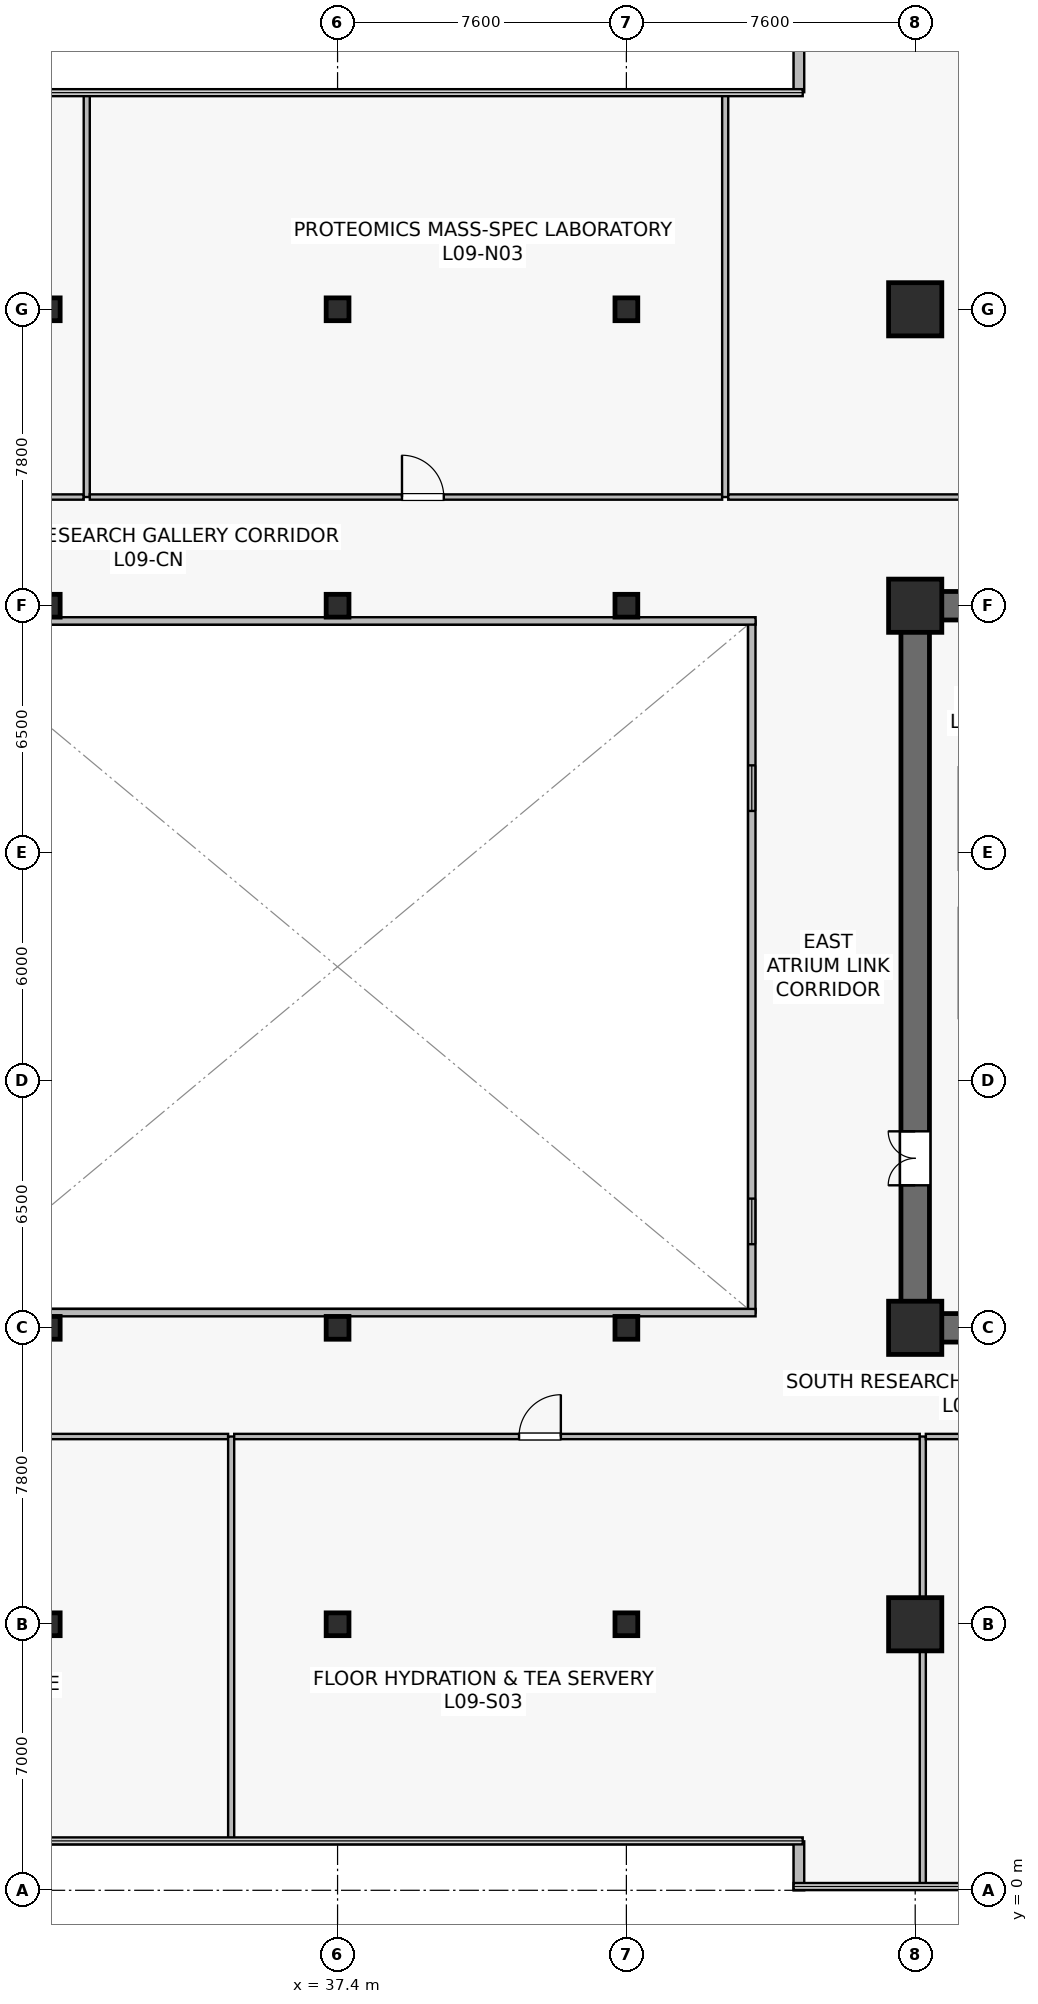
"""IFC4 building model, lengths in metres.
Left out: names, types, materials, properties, quantities, classifications, styles, units other than length and angle.
Written with IfcOpenShell. Run it as: python <this file> out.ifc"""

import sys

from ifc_helpers import new_model, si_unit, direction, frame, frame_2d, origin, origin_2d, place, context, subcontext, project, spatial, rectangle, hollow_rectangle, extrude, source, transform, mapped, element, fill, save


model = new_model("IFC4")
c1 = context("Model", 3, precision=1e-05, world=origin(), true_north=direction((0.0, 1.0)))
c2 = subcontext(c1, "Body", "Model", "MODEL_VIEW")
j1 = project(units=[si_unit("LENGTHUNIT", "METRE"), si_unit("PLANEANGLEUNIT", "RADIAN")], contexts=[c1])
p1 = place(None, origin())
s1 = spatial("IfcSite", under=j1, at=p1, CompositionType="ELEMENT")
p2 = place(p1, origin())
s2 = spatial("IfcBuilding", under=s1, at=p2, CompositionType="ELEMENT")
p3 = place(p2, frame((0.0, 0.0, 37.5)))
s3 = spatial("IfcBuildingStorey", under=s2, at=p3, CompositionType="ELEMENT", Elevation=37.5)
p4 = place(p3, frame((52.225, 14.8, 0.0), z_axis=(0.0, 0.0, 1.0), x_axis=(1.0, 0.0, 0.0)))
e1 = element("IfcWall", 1, at=p4, inside=s3, PredefinedType="SHEAR", context=c2, shape_type="SweptSolid", body=[
    extrude(rectangle(XDim=15.55, YDim=0.75, at=frame_2d((7.775, 0.0))), origin(), (0.0, 0.0, 1.0), 3.78),
])
p5 = place(p3, frame((52.225, 33.8, 0.0), z_axis=(0.0, 0.0, 1.0), x_axis=(1.0, 0.0, 0.0)))
e2 = element("IfcWall", 2, at=p5, inside=s3, PredefinedType="SHEAR", context=c2, shape_type="SweptSolid", body=[
    extrude(rectangle(XDim=15.55, YDim=0.75, at=frame_2d((7.775, 0.0))), origin(), (0.0, 0.0, 1.0), 3.78),
])
p6 = place(p5, frame((6.175, 0.0, 0.0)))
e3 = element("IfcOpeningElement", 3, at=p6, cuts=e2, PredefinedType="OPENING", context=c2, shape_type="SweptSolid", body=[
    extrude(rectangle(XDim=0.95, YDim=2.15, at=frame_2d((0.475, 1.075))), frame((0.0, 0.385, 0.0), z_axis=(0.0, -1.0, 0.0), x_axis=(1.0, 0.0, 0.0)), (0.0, 0.0, 1.0), 0.77),
])
p7 = place(p5, frame((2.635, 0.0, 0.0)))
e4 = element("IfcOpeningElement", 4, at=p7, cuts=e2, PredefinedType="OPENING", context=c2, shape_type="SweptSolid", body=[
    extrude(rectangle(XDim=0.95, YDim=2.15, at=frame_2d((0.475, 1.075))), frame((0.0, 0.385, 0.0), z_axis=(0.0, -1.0, 0.0), x_axis=(1.0, 0.0, 0.0)), (0.0, 0.0, 1.0), 0.77),
])
p8 = place(p3, frame((52.6, 15.175, 0.0), z_axis=(0.0, 0.0, 1.0), x_axis=(0.0, 1.0, 0.0)))
e5 = element("IfcWall", 5, at=p8, inside=s3, PredefinedType="SHEAR", context=c2, shape_type="SweptSolid", body=[
    extrude(rectangle(XDim=18.25, YDim=0.75, at=frame_2d((9.125, 0.0))), origin(), (0.0, 0.0, 1.0), 3.78),
])
p9 = place(p8, frame((3.375, 0.0, 0.0)))
e6 = element("IfcOpeningElement", 6, at=p9, cuts=e5, PredefinedType="OPENING", context=c2, shape_type="SweptSolid", body=[
    extrude(rectangle(XDim=1.42, YDim=2.2, at=frame_2d((0.71, 1.1))), frame((0.0, 0.385, 0.0), z_axis=(0.0, -1.0, 0.0), x_axis=(1.0, 0.0, 0.0)), (0.0, 0.0, 1.0), 0.77),
])
m1 = source(origin(), c2, "Body", "SweptSolid", [
    extrude(rectangle(XDim=1.4, YDim=1.4, at=origin_2d()), origin(), (0.0, 0.0, 1.0), 4.1),
])
for number, where, z_axis, x_axis in (
    (7, (52.6, 7.0, 0.0), (0.0, 0.0, 1.0), (1.0, 0.0, 0.0)),
    (8, (52.6, 14.8, 0.0), (0.0, 0.0, 1.0), (1.0, 0.0, 0.0)),
    (9, (52.6, 33.8, 0.0), (0.0, 0.0, 1.0), (1.0, 0.0, 0.0)),
    (10, (52.6, 41.6, 0.0), (0.0, 0.0, 1.0), (1.0, 0.0, 0.0)),
):
    element("IfcColumn", number, at=place(p3, frame(where, z_axis=z_axis, x_axis=x_axis)), inside=s3, PredefinedType="COLUMN", context=c2, shape_type="MappedRepresentation", body=[
        mapped(m1, transform((0.0, 0.0, 0.0), scale=1.0)),
    ])
m2 = source(origin(), c2, "Body", "SweptSolid", [
    extrude(hollow_rectangle(XDim=0.6, YDim=0.6, WallThickness=0.028, at=origin_2d()), origin(), (0.0, 0.0, 1.0), 4.1),
])
for number, where, z_axis, x_axis in (
    (11, (29.8, 7.0, 0.0), (0.0, 0.0, 1.0), (1.0, 0.0, 0.0)),
    (12, (29.8, 14.8, 0.0), (0.0, 0.0, 1.0), (1.0, 0.0, 0.0)),
    (13, (29.8, 33.8, 0.0), (0.0, 0.0, 1.0), (1.0, 0.0, 0.0)),
    (14, (29.8, 41.6, 0.0), (0.0, 0.0, 1.0), (1.0, 0.0, 0.0)),
    (15, (37.4, 7.0, 0.0), (0.0, 0.0, 1.0), (1.0, 0.0, 0.0)),
    (16, (37.4, 14.8, 0.0), (0.0, 0.0, 1.0), (1.0, 0.0, 0.0)),
    (17, (37.4, 33.8, 0.0), (0.0, 0.0, 1.0), (1.0, 0.0, 0.0)),
    (18, (37.4, 41.6, 0.0), (0.0, 0.0, 1.0), (1.0, 0.0, 0.0)),
    (19, (45.0, 7.0, 0.0), (0.0, 0.0, 1.0), (1.0, 0.0, 0.0)),
    (20, (45.0, 14.8, 0.0), (0.0, 0.0, 1.0), (1.0, 0.0, 0.0)),
    (21, (45.0, 33.8, 0.0), (0.0, 0.0, 1.0), (1.0, 0.0, 0.0)),
    (22, (45.0, 41.6, 0.0), (0.0, 0.0, 1.0), (1.0, 0.0, 0.0)),
):
    element("IfcColumn", number, at=place(p3, frame(where, z_axis=z_axis, x_axis=x_axis)), inside=s3, PredefinedType="COLUMN", context=c2, shape_type="MappedRepresentation", body=[
        mapped(m2, transform((0.0, 0.0, 0.0), scale=1.0)),
    ])
for number, where, z_axis, x_axis in (
    (23, (49.54, 1.288, 0.0), (0.0, 0.0, 1.0), (0.0, -1.0, 0.0)),
    (24, (49.54, 48.6, 0.0), (0.0, 0.0, 1.0), (0.0, -1.0, 0.0)),
):
    element("IfcWall", number, at=place(p3, frame(where, z_axis=z_axis, x_axis=x_axis)), inside=s3, PredefinedType="STANDARD", context=c2, shape_type="SweptSolid", body=[
        extrude(rectangle(XDim=1.288, YDim=0.28, at=frame_2d((0.644, 0.0))), origin(), (0.0, 0.0, 1.0), 3.78),
    ])
p10 = place(p3, frame((48.3, 15.2, 0.0), z_axis=(0.0, 0.0, 1.0), x_axis=(0.0, 1.0, 0.0)))
e25 = element("IfcWall", 25, at=p10, inside=s3, PredefinedType="SOLIDWALL", context=c2, shape_type="SweptSolid", body=[
    extrude(rectangle(XDim=18.2, YDim=0.195, at=frame_2d((9.1, 0.0))), origin(), (0.0, 0.0, 1.0), 3.78),
])
p11 = place(p10, frame((1.8, 0.0, 0.9)))
e26 = element("IfcOpeningElement", 26, at=p11, cuts=e25, PredefinedType="OPENING", context=c2, shape_type="SweptSolid", body=[
    extrude(rectangle(XDim=1.2, YDim=1.35, at=frame_2d((0.6, 0.675))), frame((0.0, 0.107, 0.0), z_axis=(0.0, -1.0, 0.0), x_axis=(1.0, 0.0, 0.0)), (0.0, 0.0, 1.0), 0.215),
])
p12 = place(p10, frame((13.2, 0.0, 0.9)))
e27 = element("IfcOpeningElement", 27, at=p12, cuts=e25, PredefinedType="OPENING", context=c2, shape_type="SweptSolid", body=[
    extrude(rectangle(XDim=1.2, YDim=1.35, at=frame_2d((0.6, 0.675))), frame((0.0, 0.107, 0.0), z_axis=(0.0, -1.0, 0.0), x_axis=(1.0, 0.0, 0.0)), (0.0, 0.0, 1.0), 0.215),
])
for number, where, z_axis, x_axis in (
    (28, (26.4, 15.2, 0.0), (0.0, 0.0, 1.0), (1.0, 0.0, 0.0)),
    (29, (26.4, 33.4, 0.0), (0.0, 0.0, 1.0), (1.0, 0.0, 0.0)),
):
    element("IfcWall", number, at=place(p3, frame(where, z_axis=z_axis, x_axis=x_axis)), inside=s3, PredefinedType="SOLIDWALL", context=c2, shape_type="SweptSolid", body=[
        extrude(rectangle(XDim=22.0, YDim=0.195, at=frame_2d((11.0, 0.0))), origin(), (0.0, 0.0, 1.0), 3.78),
    ])
p13 = place(p3, frame((19.48, 11.94, 0.0), z_axis=(0.0, 0.0, 1.0), x_axis=(1.0, 0.0, 0.0)))
e30 = element("IfcWall", 30, at=p13, inside=s3, PredefinedType="PARTITIONING", context=c2, shape_type="SweptSolid", body=[
    extrude(rectangle(XDim=15.04, YDim=0.14, at=frame_2d((7.52, 0.0))), origin(), (0.0, 0.0, 1.0), 3.065),
])
p14 = place(p13, frame((7.764, 0.0, 0.0)))
e31 = element("IfcOpeningElement", 31, at=p14, cuts=e30, PredefinedType="OPENING", context=c2, shape_type="SweptSolid", body=[
    extrude(rectangle(XDim=1.1, YDim=2.18, at=frame_2d((0.55, 1.09))), frame((0.0, 0.08, 0.0), z_axis=(0.0, -1.0, 0.0), x_axis=(1.0, 0.0, 0.0)), (0.0, 0.0, 1.0), 0.16),
])
p15 = place(p3, frame((34.6, 1.31, 0.0), z_axis=(0.0, 0.0, 1.0), x_axis=(0.0, 1.0, 0.0)))
e32 = element("IfcWall", 32, at=p15, inside=s3, PredefinedType="PARTITIONING", context=c2, shape_type="SweptSolid", body=[
    extrude(rectangle(XDim=10.63, YDim=0.16, at=frame_2d((5.315, 0.0))), origin(), (0.0, 0.0, 1.0), 3.015),
])
p16 = place(p3, frame((34.68, 11.94, 0.0), z_axis=(0.0, 0.0, 1.0), x_axis=(1.0, 0.0, 0.0)))
e33 = element("IfcWall", 33, at=p16, inside=s3, PredefinedType="PARTITIONING", context=c2, shape_type="SweptSolid", body=[
    extrude(rectangle(XDim=18.04, YDim=0.14, at=frame_2d((9.02, 0.0))), origin(), (0.0, 0.0, 1.0), 3.065),
])
p17 = place(p16, frame((7.496, 0.0, 0.0)))
e34 = element("IfcOpeningElement", 34, at=p17, cuts=e33, PredefinedType="OPENING", context=c2, shape_type="SweptSolid", body=[
    extrude(rectangle(XDim=1.1, YDim=2.18, at=frame_2d((0.55, 1.09))), frame((0.0, 0.08, 0.0), z_axis=(0.0, -1.0, 0.0), x_axis=(1.0, 0.0, 0.0)), (0.0, 0.0, 1.0), 0.16),
])
p18 = place(p3, frame((52.8, 0.11, 0.0), z_axis=(0.0, 0.0, 1.0), x_axis=(0.0, 1.0, 0.0)))
e35 = element("IfcWall", 35, at=p18, inside=s3, PredefinedType="PARTITIONING", context=c2, shape_type="SweptSolid", body=[
    extrude(rectangle(XDim=11.83, YDim=0.16, at=frame_2d((5.915, 0.0))), origin(), (0.0, 0.0, 1.0), 3.015),
])
p19 = place(p3, frame((52.88, 11.94, 0.0), z_axis=(0.0, 0.0, 1.0), x_axis=(1.0, 0.0, 0.0)))
e36 = element("IfcWall", 36, at=p19, inside=s3, PredefinedType="PARTITIONING", context=c2, shape_type="SweptSolid", body=[
    extrude(rectangle(XDim=14.94, YDim=0.14, at=frame_2d((7.47, 0.0))), origin(), (0.0, 0.0, 1.0), 3.065),
])
p20 = place(p19, frame((7.708, 0.0, 0.0)))
e37 = element("IfcOpeningElement", 37, at=p20, cuts=e36, PredefinedType="OPENING", context=c2, shape_type="SweptSolid", body=[
    extrude(rectangle(XDim=1.1, YDim=2.18, at=frame_2d((0.55, 1.09))), frame((0.0, 0.08, 0.0), z_axis=(0.0, -1.0, 0.0), x_axis=(1.0, 0.0, 0.0)), (0.0, 0.0, 1.0), 0.16),
])
p21 = place(p3, frame((15.88, 36.66, 0.0), z_axis=(0.0, 0.0, 1.0), x_axis=(1.0, 0.0, 0.0)))
e38 = element("IfcWall", 38, at=p21, inside=s3, PredefinedType="PARTITIONING", context=c2, shape_type="SweptSolid", body=[
    extrude(rectangle(XDim=14.84, YDim=0.14, at=frame_2d((7.42, 0.0))), origin(), (0.0, 0.0, 1.0), 3.065),
])
p22 = place(p21, frame((5.696, 0.0, 0.0)))
e39 = element("IfcOpeningElement", 39, at=p22, cuts=e38, PredefinedType="OPENING", context=c2, shape_type="SweptSolid", body=[
    extrude(rectangle(XDim=1.1, YDim=2.18, at=frame_2d((0.55, 1.09))), frame((0.0, 0.08, 0.0), z_axis=(0.0, -1.0, 0.0), x_axis=(1.0, 0.0, 0.0)), (0.0, 0.0, 1.0), 0.16),
])
p23 = place(p3, frame((30.8, 36.66, 0.0), z_axis=(0.0, 0.0, 1.0), x_axis=(0.0, 1.0, 0.0)))
e40 = element("IfcWall", 40, at=p23, inside=s3, PredefinedType="PARTITIONING", context=c2, shape_type="SweptSolid", body=[
    extrude(rectangle(XDim=10.63, YDim=0.16, at=frame_2d((5.315, 0.0))), origin(), (0.0, 0.0, 1.0), 3.015),
])
p24 = place(p3, frame((30.88, 36.66, 0.0), z_axis=(0.0, 0.0, 1.0), x_axis=(1.0, 0.0, 0.0)))
e41 = element("IfcWall", 41, at=p24, inside=s3, PredefinedType="PARTITIONING", context=c2, shape_type="SweptSolid", body=[
    extrude(rectangle(XDim=16.64, YDim=0.14, at=frame_2d((8.32, 0.0))), origin(), (0.0, 0.0, 1.0), 3.065),
])
p25 = place(p24, frame((8.215, 0.0, 0.0)))
e42 = element("IfcOpeningElement", 42, at=p25, cuts=e41, PredefinedType="OPENING", context=c2, shape_type="SweptSolid", body=[
    extrude(rectangle(XDim=1.1, YDim=2.18, at=frame_2d((0.55, 1.09))), frame((0.0, 0.08, 0.0), z_axis=(0.0, -1.0, 0.0), x_axis=(1.0, 0.0, 0.0)), (0.0, 0.0, 1.0), 0.16),
])
p26 = place(p3, frame((47.6, 36.66, 0.0), z_axis=(0.0, 0.0, 1.0), x_axis=(0.0, 1.0, 0.0)))
e43 = element("IfcWall", 43, at=p26, inside=s3, PredefinedType="PARTITIONING", context=c2, shape_type="SweptSolid", body=[
    extrude(rectangle(XDim=10.63, YDim=0.16, at=frame_2d((5.315, 0.0))), origin(), (0.0, 0.0, 1.0), 3.015),
])
p27 = place(p3, frame((47.68, 36.66, 0.0), z_axis=(0.0, 0.0, 1.0), x_axis=(1.0, 0.0, 0.0)))
e44 = element("IfcWall", 44, at=p27, inside=s3, PredefinedType="PARTITIONING", context=c2, shape_type="SweptSolid", body=[
    extrude(rectangle(XDim=20.14, YDim=0.14, at=frame_2d((10.07, 0.0))), origin(), (0.0, 0.0, 1.0), 3.065),
])
p28 = place(p27, frame((7.869, 0.0, 0.0)))
e45 = element("IfcOpeningElement", 45, at=p28, cuts=e44, PredefinedType="OPENING", context=c2, shape_type="SweptSolid", body=[
    extrude(rectangle(XDim=1.1, YDim=2.18, at=frame_2d((0.55, 1.09))), frame((0.0, 0.08, 0.0), z_axis=(0.0, -1.0, 0.0), x_axis=(1.0, 0.0, 0.0)), (0.0, 0.0, 1.0), 0.16),
])
m3 = source(origin(), c2, "Body", "SweptSolid", [
    extrude(rectangle(XDim=1.2, YDim=1.35, at=frame_2d((0.6, 0.675))), frame((0.0, 0.03, 0.0), z_axis=(0.0, -1.0, 0.0), x_axis=(1.0, 0.0, 0.0)), (0.0, 0.0, 1.0), 0.06),
])
p29 = place(p11, origin())
e46 = element("IfcWindow", 46, at=p29, inside=s3, PartitioningType="SINGLE_PANEL", PredefinedType="WINDOW", context=c2, shape_type="MappedRepresentation", body=[
    mapped(m3, transform((0.0, 0.0, 0.0), scale=1.0)),
])
fill(e26, e46)
p30 = place(p12, origin())
e47 = element("IfcWindow", 47, at=p30, inside=s3, PartitioningType="SINGLE_PANEL", PredefinedType="WINDOW", context=c2, shape_type="MappedRepresentation", body=[
    mapped(m3, transform((0.0, 0.0, 0.0), scale=1.0)),
])
fill(e27, e47)
m4 = source(origin(), c2, "Body", "SweptSolid", [
    extrude(rectangle(XDim=1.42, YDim=2.2, at=frame_2d((0.71, 1.1))), frame((0.0, 0.025, 0.0), z_axis=(0.0, -1.0, 0.0), x_axis=(1.0, 0.0, 0.0)), (0.0, 0.0, 1.0), 0.05),
])
p31 = place(p9, origin())
e48 = element("IfcDoor", 48, at=p31, inside=s3, OperationType="DOUBLE_DOOR_SINGLE_SWING", PredefinedType="DOOR", context=c2, shape_type="MappedRepresentation", body=[
    mapped(m4, transform((0.0, 0.0, 0.0), scale=1.0)),
])
fill(e6, e48)
m5 = source(origin(), c2, "Body", "SweptSolid", [
    extrude(rectangle(XDim=1.1, YDim=2.18, at=frame_2d((0.55, 1.09))), frame((0.0, 0.025, 0.0), z_axis=(0.0, -1.0, 0.0), x_axis=(1.0, 0.0, 0.0)), (0.0, 0.0, 1.0), 0.05),
])
p32 = place(p17, origin())
e49 = element("IfcDoor", 49, at=p32, inside=s3, OperationType="SINGLE_SWING_RIGHT", PredefinedType="DOOR", context=c2, shape_type="MappedRepresentation", body=[
    mapped(m5, transform((0.0, 0.0, 0.0), scale=1.0)),
])
fill(e34, e49)
p33 = place(p25, origin())
e50 = element("IfcDoor", 50, at=p33, inside=s3, OperationType="SINGLE_SWING_LEFT", PredefinedType="DOOR", context=c2, shape_type="MappedRepresentation", body=[
    mapped(m5, transform((0.0, 0.0, 0.0), scale=1.0)),
])
fill(e42, e50)
save(model, sys.argv[1])
